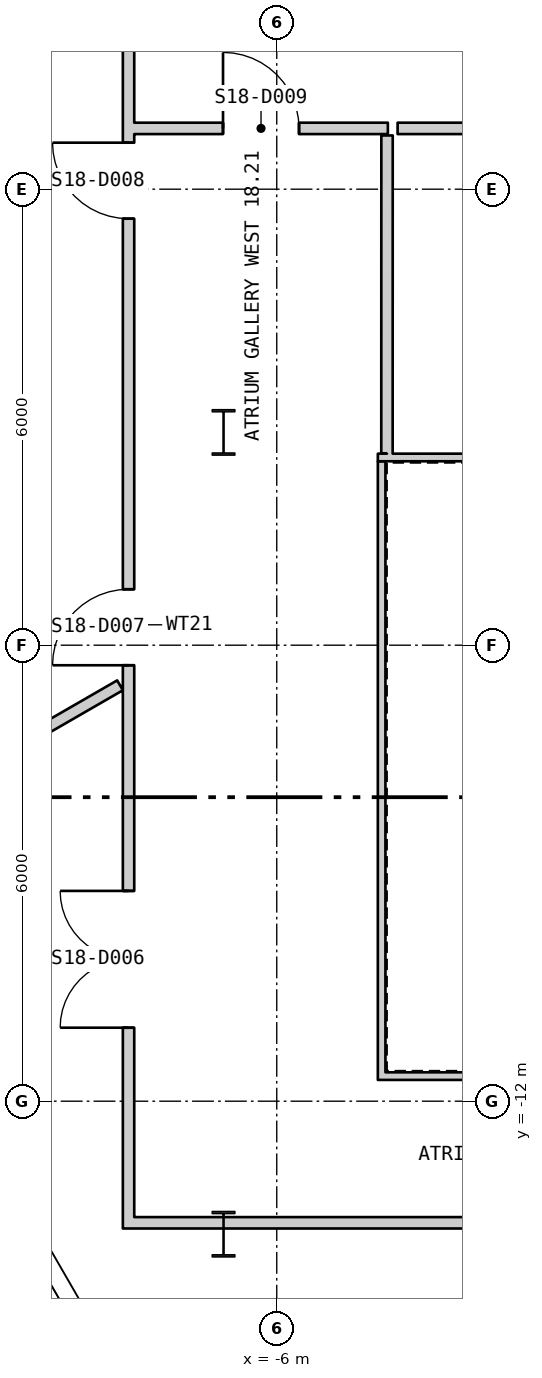
"""IFC4 building model, lengths in metres.
Left out: names, types, materials, properties, quantities, classifications, styles, units other than length and angle.
Written with IfcOpenShell. Run it as: python <this file> out.ifc"""

import sys

from ifc_helpers import new_model, si_unit, direction, frame, frame_2d, origin, origin_2d, place, context, subcontext, project, spatial, polyline, rectangle, i_section, outline, extrude, element, fill, save


model = new_model("IFC4")
c1 = context("Model", 3, precision=1e-05, world=origin(), true_north=direction((0.0, 1.0)))
c2 = subcontext(c1, "Body", "Model", "MODEL_VIEW")
j1 = project(units=[si_unit("LENGTHUNIT", "METRE"), si_unit("PLANEANGLEUNIT", "RADIAN")], contexts=[c1])
p1 = place(None, origin())
s1 = spatial("IfcSite", under=j1, at=p1, CompositionType="ELEMENT")
p2 = place(p1, origin())
s2 = spatial("IfcBuilding", under=s1, at=p2, CompositionType="ELEMENT")
p3 = place(p2, frame((0.0, 0.0, 245.4)))
s3 = spatial("IfcBuildingStorey", under=s2, at=p3, CompositionType="ELEMENT", Elevation=245.4)
for number, where, z_axis, x_axis in (
    (1, (-6.7, -3.2, 0.0), (0.0, 0.0, 1.0), (1.0, 0.0, 0.0)),
    (2, (-6.7, -13.75, 0.0), (0.0, 0.0, 1.0), (1.0, 0.0, 0.0)),
):
    element("IfcColumn", number, at=place(p3, frame(where, z_axis=z_axis, x_axis=x_axis)), inside=s3, PredefinedType="COLUMN", context=c2, shape_type="SweptSolid", body=[
        extrude(i_section(OverallWidth=0.3, OverallDepth=0.6, WebThickness=0.015, FlangeThickness=0.03, at=origin_2d()), origin(), (0.0, 0.0, 1.0), 3.9),
    ])
p4 = place(p3, frame((-25.85, 14.822, -0.18), z_axis=(0.0, 0.0, 1.0), x_axis=(0.500000335318, -0.866025210188, 0.0)))
e3 = element("IfcWall", 3, at=p4, inside=s3, PredefinedType="SOLIDWALL", context=c2, shape_type="SweptSolid", body=[
    extrude(outline(polyline([(-0.13, -0.225), (45.88, -0.225), (45.62, 0.225), (0.13, 0.225), (-0.13, -0.225)])), origin(), (0.0, 0.0, 1.0), 3.68),
])
p5 = place(p4, frame((1.425, 0.0, 1.08)))
e4 = element("IfcOpeningElement", 4, at=p5, cuts=e3, PredefinedType="OPENING", context=c2, shape_type="SweptSolid", body=[
    extrude(rectangle(XDim=2.4, YDim=2.0, at=frame_2d((1.2, 1.0))), frame((0.0, 0.235, 0.0), z_axis=(0.0, -1.0, 0.0), x_axis=(1.0, 0.0, 0.0)), (0.0, 0.0, 1.0), 0.47),
])
p6 = place(p4, frame((10.403, 0.0, 1.08)))
e5 = element("IfcOpeningElement", 5, at=p6, cuts=e3, PredefinedType="OPENING", context=c2, shape_type="SweptSolid", body=[
    extrude(rectangle(XDim=2.4, YDim=2.0, at=frame_2d((1.2, 1.0))), frame((0.0, 0.235, 0.0), z_axis=(0.0, -1.0, 0.0), x_axis=(1.0, 0.0, 0.0)), (0.0, 0.0, 1.0), 0.47),
])
p7 = place(p4, frame((14.912, 0.0, 1.08)))
e6 = element("IfcOpeningElement", 6, at=p7, cuts=e3, PredefinedType="OPENING", context=c2, shape_type="SweptSolid", body=[
    extrude(rectangle(XDim=2.4, YDim=2.0, at=frame_2d((1.2, 1.0))), frame((0.0, 0.235, 0.0), z_axis=(0.0, -1.0, 0.0), x_axis=(1.0, 0.0, 0.0)), (0.0, 0.0, 1.0), 0.47),
])
p8 = place(p4, frame((19.421, 0.0, 1.08)))
e7 = element("IfcOpeningElement", 7, at=p8, cuts=e3, PredefinedType="OPENING", context=c2, shape_type="SweptSolid", body=[
    extrude(rectangle(XDim=2.4, YDim=2.0, at=frame_2d((1.2, 1.0))), frame((0.0, 0.235, 0.0), z_axis=(0.0, -1.0, 0.0), x_axis=(1.0, 0.0, 0.0)), (0.0, 0.0, 1.0), 0.47),
])
p9 = place(p4, frame((23.929, 0.0, 1.08)))
e8 = element("IfcOpeningElement", 8, at=p9, cuts=e3, PredefinedType="OPENING", context=c2, shape_type="SweptSolid", body=[
    extrude(rectangle(XDim=2.4, YDim=2.0, at=frame_2d((1.2, 1.0))), frame((0.0, 0.235, 0.0), z_axis=(0.0, -1.0, 0.0), x_axis=(1.0, 0.0, 0.0)), (0.0, 0.0, 1.0), 0.47),
])
p10 = place(p4, frame((28.438, 0.0, 1.08)))
e9 = element("IfcOpeningElement", 9, at=p10, cuts=e3, PredefinedType="OPENING", context=c2, shape_type="SweptSolid", body=[
    extrude(rectangle(XDim=2.4, YDim=2.0, at=frame_2d((1.2, 1.0))), frame((0.0, 0.235, 0.0), z_axis=(0.0, -1.0, 0.0), x_axis=(1.0, 0.0, 0.0)), (0.0, 0.0, 1.0), 0.47),
])
p11 = place(p4, frame((32.947, 0.0, 1.08)))
e10 = element("IfcOpeningElement", 10, at=p11, cuts=e3, PredefinedType="OPENING", context=c2, shape_type="SweptSolid", body=[
    extrude(rectangle(XDim=2.4, YDim=2.0, at=frame_2d((1.2, 1.0))), frame((0.0, 0.235, 0.0), z_axis=(0.0, -1.0, 0.0), x_axis=(1.0, 0.0, 0.0)), (0.0, 0.0, 1.0), 0.47),
])
p12 = place(p4, frame((37.455, 0.0, 1.08)))
e11 = element("IfcOpeningElement", 11, at=p12, cuts=e3, PredefinedType="OPENING", context=c2, shape_type="SweptSolid", body=[
    extrude(rectangle(XDim=2.4, YDim=2.0, at=frame_2d((1.2, 1.0))), frame((0.0, 0.235, 0.0), z_axis=(0.0, -1.0, 0.0), x_axis=(1.0, 0.0, 0.0)), (0.0, 0.0, 1.0), 0.47),
])
p13 = place(p4, frame((41.925, 0.0, 1.08)))
e12 = element("IfcOpeningElement", 12, at=p13, cuts=e3, PredefinedType="OPENING", context=c2, shape_type="SweptSolid", body=[
    extrude(rectangle(XDim=2.4, YDim=2.0, at=frame_2d((1.2, 1.0))), frame((0.0, 0.235, 0.0), z_axis=(0.0, -1.0, 0.0), x_axis=(1.0, 0.0, 0.0)), (0.0, 0.0, 1.0), 0.47),
])
for number, where, z_axis, x_axis in (
    (13, (-4.67, -11.67, 0.0), (0.0, 0.0, 1.0), (1.0, 0.0, 0.0)),
    (14, (4.67, -3.53, 0.0), (0.0, 0.0, 1.0), (-1.0, 0.0, 0.0)),
):
    element("IfcWall", number, at=place(p3, frame(where, z_axis=z_axis, x_axis=x_axis)), inside=s3, PredefinedType="PARTITIONING", context=c2, shape_type="SweptSolid", body=[
        extrude(rectangle(XDim=9.34, YDim=0.1, at=frame_2d((4.67, 0.0))), origin(), (0.0, 0.0, 1.0), 3.7),
    ])
p14 = place(p3, frame((-4.62, -3.58, 0.0), z_axis=(0.0, 0.0, 1.0), x_axis=(0.0, -1.0, 0.0)))
e15 = element("IfcWall", 15, at=p14, inside=s3, PredefinedType="PARTITIONING", context=c2, shape_type="SweptSolid", body=[
    extrude(rectangle(XDim=8.04, YDim=0.1, at=frame_2d((4.02, 0.0))), origin(), (0.0, 0.0, 1.0), 3.7),
])
p15 = place(p3, frame((-11.574, -8.554, 0.0), z_axis=(0.0, 0.0, 1.0), x_axis=(0.866202010042, 0.499693984153, 0.0)))
e16 = element("IfcWall", 16, at=p15, inside=s3, PredefinedType="PARTITIONING", context=c2, shape_type="SweptSolid", body=[
    extrude(rectangle(XDim=4.054, YDim=0.15, at=frame_2d((2.027, 0.0))), origin(), (0.0, 0.0, 1.0), 3.7),
])
p16 = place(p3, frame((-7.95, -13.675, 0.0), z_axis=(0.0, 0.0, 1.0), x_axis=(0.0, 1.0, 0.0)))
e17 = element("IfcWall", 17, at=p16, inside=s3, PredefinedType="PARTITIONING", context=c2, shape_type="SweptSolid", body=[
    extrude(rectangle(XDim=15.887, YDim=0.15, at=frame_2d((7.944, 0.0))), origin(), (0.0, 0.0, 1.0), 3.7),
])
p17 = place(p16, frame((2.642, 0.0, 0.0)))
e18 = element("IfcOpeningElement", 18, at=p17, cuts=e17, PredefinedType="OPENING", context=c2, shape_type="SweptSolid", body=[
    extrude(rectangle(XDim=1.8, YDim=2.1, at=frame_2d((0.9, 1.05))), frame((0.0, 0.085, 0.0), z_axis=(0.0, -1.0, 0.0), x_axis=(1.0, 0.0, 0.0)), (0.0, 0.0, 1.0), 0.17),
])
p18 = place(p16, frame((7.411, 0.0, 0.0)))
e19 = element("IfcOpeningElement", 19, at=p18, cuts=e17, PredefinedType="OPENING", context=c2, shape_type="SweptSolid", body=[
    extrude(rectangle(XDim=1.0, YDim=2.1, at=frame_2d((0.5, 1.05))), frame((0.0, 0.085, 0.0), z_axis=(0.0, -1.0, 0.0), x_axis=(1.0, 0.0, 0.0)), (0.0, 0.0, 1.0), 0.17),
])
p19 = place(p16, frame((13.287, 0.0, 0.0)))
e20 = element("IfcOpeningElement", 20, at=p19, cuts=e17, PredefinedType="OPENING", context=c2, shape_type="SweptSolid", body=[
    extrude(rectangle(XDim=1.0, YDim=2.1, at=frame_2d((0.5, 1.05))), frame((0.0, 0.085, 0.0), z_axis=(0.0, -1.0, 0.0), x_axis=(1.0, 0.0, 0.0)), (0.0, 0.0, 1.0), 0.17),
])
p20 = place(p3, frame((-7.875, -13.6, 0.0), z_axis=(0.0, 0.0, 1.0), x_axis=(1.0, 0.0, 0.0)))
e21 = element("IfcWall", 21, at=p20, inside=s3, PredefinedType="PARTITIONING", context=c2, shape_type="SweptSolid", body=[
    extrude(rectangle(XDim=1.175, YDim=0.15, at=frame_2d((0.588, 0.0))), origin(), (0.0, 0.0, 1.0), 3.16),
])
p21 = place(p3, frame((-6.7, -13.6, 0.0), z_axis=(0.0, 0.0, 1.0), x_axis=(1.0, 0.0, 0.0)))
e22 = element("IfcWall", 22, at=p21, inside=s3, PredefinedType="PARTITIONING", context=c2, shape_type="SweptSolid", body=[
    extrude(rectangle(XDim=5.0, YDim=0.15, at=frame_2d((2.5, 0.0))), origin(), (0.0, 0.0, 1.0), 2.91),
])
p22 = place(p3, frame((-7.875, 0.8, 0.0), z_axis=(0.0, 0.0, 1.0), x_axis=(1.0, 0.0, 0.0)))
e23 = element("IfcWall", 23, at=p22, inside=s3, PredefinedType="PARTITIONING", context=c2, shape_type="SweptSolid", body=[
    extrude(rectangle(XDim=3.337, YDim=0.15, at=frame_2d((1.669, 0.0))), origin(), (0.0, 0.0, 1.0), 3.7),
])
p23 = place(p22, frame((1.168, 0.0, 0.0)))
e24 = element("IfcOpeningElement", 24, at=p23, cuts=e23, PredefinedType="OPENING", context=c2, shape_type="SweptSolid", body=[
    extrude(rectangle(XDim=1.0, YDim=2.1, at=frame_2d((0.5, 1.05))), frame((0.0, 0.085, 0.0), z_axis=(0.0, -1.0, 0.0), x_axis=(1.0, 0.0, 0.0)), (0.0, 0.0, 1.0), 0.17),
])
p24 = place(p3, frame((-4.55, -3.48, 0.0), z_axis=(0.0, 0.0, 1.0), x_axis=(0.000238834481, 0.999999971479, 0.0)))
e25 = element("IfcWall", 25, at=p24, inside=s3, PredefinedType="PARTITIONING", context=c2, shape_type="SweptSolid", body=[
    extrude(rectangle(XDim=4.187, YDim=0.15, at=frame_2d((2.094, 0.0))), origin(), (0.0, 0.0, 1.0), 3.7),
])
p25 = place(p3, frame((-4.41, 0.8, 0.0), z_axis=(0.0, 0.0, 1.0), x_axis=(1.0, 0.0, 0.0)))
e26 = element("IfcWall", 26, at=p25, inside=s3, PredefinedType="PARTITIONING", context=c2, shape_type="SweptSolid", body=[
    extrude(rectangle(XDim=8.82, YDim=0.15, at=frame_2d((4.41, 0.0))), origin(), (0.0, 0.0, 1.0), 3.7),
])
p26 = place(p25, frame((3.106, 0.0, 0.0)))
e27 = element("IfcOpeningElement", 27, at=p26, cuts=e26, PredefinedType="OPENING", context=c2, shape_type="SweptSolid", body=[
    extrude(rectangle(XDim=1.0, YDim=2.1, at=frame_2d((0.5, 1.05))), frame((0.0, 0.085, 0.0), z_axis=(0.0, -1.0, 0.0), x_axis=(1.0, 0.0, 0.0)), (0.0, 0.0, 1.0), 0.17),
])
p27 = place(p25, frame((4.611, 0.0, 0.0)))
e28 = element("IfcOpeningElement", 28, at=p27, cuts=e26, PredefinedType="OPENING", context=c2, shape_type="SweptSolid", body=[
    extrude(rectangle(XDim=1.0, YDim=2.1, at=frame_2d((0.5, 1.05))), frame((0.0, 0.085, 0.0), z_axis=(0.0, -1.0, 0.0), x_axis=(1.0, 0.0, 0.0)), (0.0, 0.0, 1.0), 0.17),
])
p28 = place(p11, origin())
e29 = element("IfcWindow", 29, at=p28, inside=s3, PartitioningType="SINGLE_PANEL", PredefinedType="WINDOW", context=c2, shape_type="SweptSolid", body=[
    extrude(rectangle(XDim=2.4, YDim=2.0, at=frame_2d((1.2, 1.0))), frame((0.0, 0.105, 0.0), z_axis=(0.0, -1.0, 0.0), x_axis=(1.0, 0.0, 0.0)), (0.0, 0.0, 1.0), 0.06),
])
fill(e10, e29)
p29 = place(p17, origin())
e30 = element("IfcDoor", 30, at=p29, inside=s3, OperationType="DOUBLE_DOOR_SINGLE_SWING", PredefinedType="DOOR", context=c2, shape_type="SweptSolid", body=[
    extrude(rectangle(XDim=1.8, YDim=2.1, at=frame_2d((0.9, 1.05))), frame((0.0, 0.025, 0.0), z_axis=(0.0, -1.0, 0.0), x_axis=(1.0, 0.0, 0.0)), (0.0, 0.0, 1.0), 0.05),
])
fill(e18, e30)
p30 = place(p18, origin())
e31 = element("IfcDoor", 31, at=p30, inside=s3, OperationType="SINGLE_SWING_RIGHT", PredefinedType="DOOR", context=c2, shape_type="SweptSolid", body=[
    extrude(rectangle(XDim=1.0, YDim=2.1, at=frame_2d((0.5, 1.05))), frame((0.0, 0.025, 0.0), z_axis=(0.0, -1.0, 0.0), x_axis=(1.0, 0.0, 0.0)), (0.0, 0.0, 1.0), 0.05),
])
fill(e19, e31)
p31 = place(p19, origin())
e32 = element("IfcDoor", 32, at=p31, inside=s3, OperationType="SINGLE_SWING_LEFT", PredefinedType="DOOR", context=c2, shape_type="SweptSolid", body=[
    extrude(rectangle(XDim=1.0, YDim=2.1, at=frame_2d((0.5, 1.05))), frame((0.0, 0.025, 0.0), z_axis=(0.0, -1.0, 0.0), x_axis=(1.0, 0.0, 0.0)), (0.0, 0.0, 1.0), 0.05),
])
fill(e20, e32)
p32 = place(p23, origin())
e33 = element("IfcDoor", 33, at=p32, inside=s3, OperationType="SINGLE_SWING_RIGHT", PredefinedType="DOOR", context=c2, shape_type="SweptSolid", body=[
    extrude(rectangle(XDim=1.0, YDim=2.1, at=frame_2d((0.5, 1.05))), frame((0.0, 0.025, 0.0), z_axis=(0.0, -1.0, 0.0), x_axis=(1.0, 0.0, 0.0)), (0.0, 0.0, 1.0), 0.05),
])
fill(e24, e33)
save(model, sys.argv[1])
